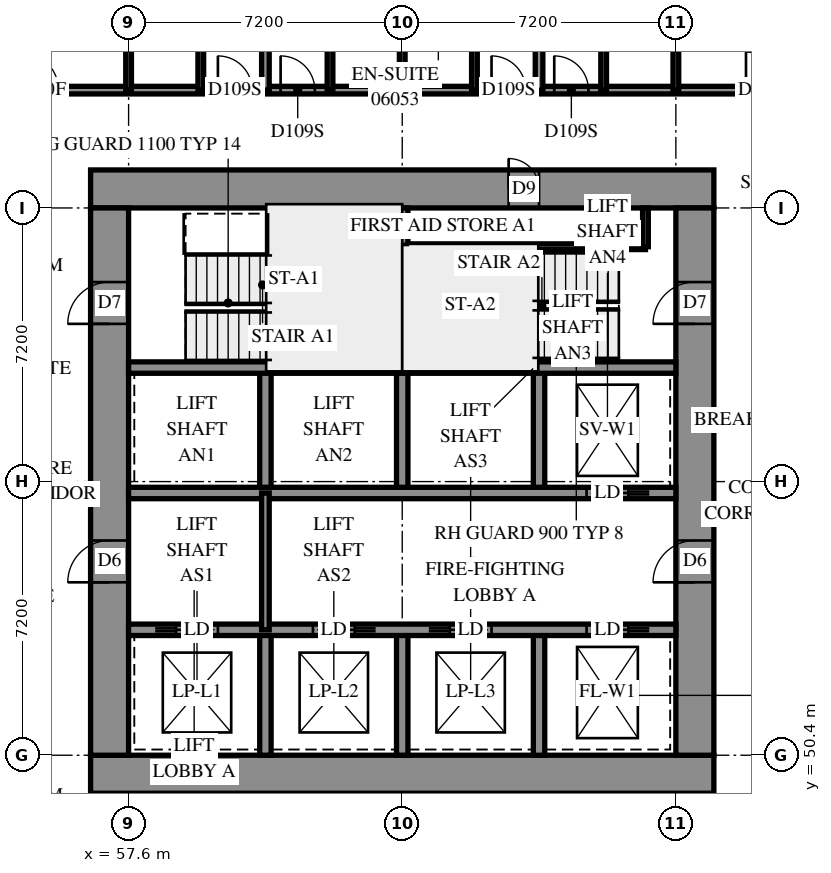
"""IFC4 building model, lengths in metres.
Left out: names, types, materials, properties, quantities, classifications, styles, units other than length and angle.
Written with IfcOpenShell. Run it as: python <this file> out.ifc"""

import sys

from ifc_helpers import new_model, si_unit, direction, frame, frame_2d, origin, place, context, subcontext, project, spatial, rectangle, extrude, element, fill, save


model = new_model("IFC4")
c1 = context("Model", 3, precision=1e-05, world=origin(), true_north=direction((0.0, 1.0)))
c2 = subcontext(c1, "Body", "Model", "MODEL_VIEW")
j1 = project(units=[si_unit("LENGTHUNIT", "METRE"), si_unit("PLANEANGLEUNIT", "RADIAN")], contexts=[c1])
p1 = place(None, origin())
s1 = spatial("IfcSite", under=j1, at=p1, CompositionType="ELEMENT")
p2 = place(p1, origin())
s2 = spatial("IfcBuilding", under=s1, at=p2, CompositionType="ELEMENT")
p3 = place(p2, frame((0.0, 0.0, 27.0)))
s3 = spatial("IfcBuildingStorey", under=s2, at=p3, CompositionType="ELEMENT", Elevation=27.0)
p4 = place(p3, frame((56.6, 49.9, -0.3), z_axis=(0.0, 0.0, 1.0), x_axis=(1.0, 0.0, 0.0)))
e1 = element("IfcWall", 1, at=p4, inside=s3, PredefinedType="SHEAR", context=c2, shape_type="SweptSolid", body=[
    extrude(rectangle(XDim=16.4, YDim=1.0, at=frame_2d((8.2, 0.0))), origin(), (0.0, 0.0, 1.0), 2.7),
])
p5 = place(p3, frame((56.6, 65.3, -0.3), z_axis=(0.0, 0.0, 1.0), x_axis=(1.0, 0.0, 0.0)))
e2 = element("IfcWall", 2, at=p5, inside=s3, PredefinedType="SHEAR", context=c2, shape_type="SweptSolid", body=[
    extrude(rectangle(XDim=16.4, YDim=1.0, at=frame_2d((8.2, 0.0))), origin(), (0.0, 0.0, 1.0), 2.7),
])
p6 = place(p5, frame((11.0, 0.0, 0.3)))
e3 = element("IfcOpeningElement", 3, at=p6, cuts=e2, PredefinedType="OPENING", context=c2, shape_type="SweptSolid", body=[
    extrude(rectangle(XDim=0.8, YDim=2.1, at=frame_2d((0.4, 1.05))), frame((0.0, 0.51, 0.0), z_axis=(0.0, -1.0, 0.0), x_axis=(1.0, 0.0, 0.0)), (0.0, 0.0, 1.0), 1.02),
])
p7 = place(p3, frame((57.1, 50.4, -0.3), z_axis=(0.0, 0.0, 1.0), x_axis=(0.0, 1.0, 0.0)))
e4 = element("IfcWall", 4, at=p7, inside=s3, PredefinedType="SHEAR", context=c2, shape_type="SweptSolid", body=[
    extrude(rectangle(XDim=14.4, YDim=1.0, at=frame_2d((7.2, 0.0))), origin(), (0.0, 0.0, 1.0), 2.7),
])
p8 = place(p7, frame((4.55, 0.0, 0.3)))
e5 = element("IfcOpeningElement", 5, at=p8, cuts=e4, PredefinedType="OPENING", context=c2, shape_type="SweptSolid", body=[
    extrude(rectangle(XDim=1.1, YDim=2.1, at=frame_2d((0.55, 1.05))), frame((0.0, 0.51, 0.0), z_axis=(0.0, -1.0, 0.0), x_axis=(1.0, 0.0, 0.0)), (0.0, 0.0, 1.0), 1.02),
])
p9 = place(p7, frame((11.35, 0.0, 0.3)))
e6 = element("IfcOpeningElement", 6, at=p9, cuts=e4, PredefinedType="OPENING", context=c2, shape_type="SweptSolid", body=[
    extrude(rectangle(XDim=1.1, YDim=2.1, at=frame_2d((0.55, 1.05))), frame((0.0, 0.51, 0.0), z_axis=(0.0, -1.0, 0.0), x_axis=(1.0, 0.0, 0.0)), (0.0, 0.0, 1.0), 1.02),
])
p10 = place(p3, frame((72.5, 50.4, -0.3), z_axis=(0.0, 0.0, 1.0), x_axis=(0.0, 1.0, 0.0)))
e7 = element("IfcWall", 7, at=p10, inside=s3, PredefinedType="SHEAR", context=c2, shape_type="SweptSolid", body=[
    extrude(rectangle(XDim=14.4, YDim=1.0, at=frame_2d((7.2, 0.0))), origin(), (0.0, 0.0, 1.0), 2.7),
])
p11 = place(p10, frame((4.55, 0.0, 0.3)))
e8 = element("IfcOpeningElement", 8, at=p11, cuts=e7, PredefinedType="OPENING", context=c2, shape_type="SweptSolid", body=[
    extrude(rectangle(XDim=1.1, YDim=2.1, at=frame_2d((0.55, 1.05))), frame((0.0, 0.51, 0.0), z_axis=(0.0, -1.0, 0.0), x_axis=(1.0, 0.0, 0.0)), (0.0, 0.0, 1.0), 1.02),
])
p12 = place(p10, frame((11.35, 0.0, 0.3)))
e9 = element("IfcOpeningElement", 9, at=p12, cuts=e7, PredefinedType="OPENING", context=c2, shape_type="SweptSolid", body=[
    extrude(rectangle(XDim=1.1, YDim=2.1, at=frame_2d((0.55, 1.05))), frame((0.0, 0.51, 0.0), z_axis=(0.0, -1.0, 0.0), x_axis=(1.0, 0.0, 0.0)), (0.0, 0.0, 1.0), 1.02),
])
for number, where, z_axis, x_axis in (
    (10, (61.2, 50.4, 0.0), (0.0, 0.0, 1.0), (0.0, 1.0, 0.0)),
    (11, (61.2, 57.3, 0.0), (0.0, 0.0, 1.0), (0.0, 1.0, 0.0)),
    (12, (64.8, 50.4, 0.0), (0.0, 0.0, 1.0), (0.0, 1.0, 0.0)),
    (13, (64.8, 57.3, 0.0), (0.0, 0.0, 1.0), (0.0, 1.0, 0.0)),
    (14, (68.4, 50.4, 0.0), (0.0, 0.0, 1.0), (0.0, 1.0, 0.0)),
    (15, (68.4, 57.3, 0.0), (0.0, 0.0, 1.0), (0.0, 1.0, 0.0)),
):
    element("IfcWall", number, at=place(p3, frame(where, z_axis=z_axis, x_axis=x_axis)), inside=s3, PredefinedType="SOLIDWALL", context=c2, shape_type="SweptSolid", body=[
        extrude(rectangle(XDim=3.3, YDim=0.3, at=frame_2d((1.65, 0.0))), origin(), (0.0, 0.0, 1.0), 3.1),
    ])
p13 = place(p3, frame((57.6, 53.7, 0.0), z_axis=(0.0, 0.0, 1.0), x_axis=(1.0, 0.0, 0.0)))
e16 = element("IfcWall", 16, at=p13, inside=s3, PredefinedType="SOLIDWALL", context=c2, shape_type="SweptSolid", body=[
    extrude(rectangle(XDim=14.4, YDim=0.3, at=frame_2d((7.2, 0.0))), origin(), (0.0, 0.0, 1.0), 3.1),
])
p14 = place(p13, frame((1.25, 0.0, 0.0)))
e17 = element("IfcOpeningElement", 17, at=p14, cuts=e16, PredefinedType="OPENING", context=c2, shape_type="SweptSolid", body=[
    extrude(rectangle(XDim=1.1, YDim=2.1, at=frame_2d((0.55, 1.05))), frame((0.0, 0.16, 0.0), z_axis=(0.0, -1.0, 0.0), x_axis=(1.0, 0.0, 0.0)), (0.0, 0.0, 1.0), 0.32),
])
p15 = place(p13, frame((4.85, 0.0, 0.0)))
e18 = element("IfcOpeningElement", 18, at=p15, cuts=e16, PredefinedType="OPENING", context=c2, shape_type="SweptSolid", body=[
    extrude(rectangle(XDim=1.1, YDim=2.1, at=frame_2d((0.55, 1.05))), frame((0.0, 0.16, 0.0), z_axis=(0.0, -1.0, 0.0), x_axis=(1.0, 0.0, 0.0)), (0.0, 0.0, 1.0), 0.32),
])
p16 = place(p13, frame((8.45, 0.0, 0.0)))
e19 = element("IfcOpeningElement", 19, at=p16, cuts=e16, PredefinedType="OPENING", context=c2, shape_type="SweptSolid", body=[
    extrude(rectangle(XDim=1.1, YDim=2.1, at=frame_2d((0.55, 1.05))), frame((0.0, 0.16, 0.0), z_axis=(0.0, -1.0, 0.0), x_axis=(1.0, 0.0, 0.0)), (0.0, 0.0, 1.0), 0.32),
])
p17 = place(p13, frame((12.05, 0.0, 0.0)))
e20 = element("IfcOpeningElement", 20, at=p17, cuts=e16, PredefinedType="OPENING", context=c2, shape_type="SweptSolid", body=[
    extrude(rectangle(XDim=1.1, YDim=2.1, at=frame_2d((0.55, 1.05))), frame((0.0, 0.16, 0.0), z_axis=(0.0, -1.0, 0.0), x_axis=(1.0, 0.0, 0.0)), (0.0, 0.0, 1.0), 0.32),
])
p18 = place(p3, frame((57.6, 57.3, 0.0), z_axis=(0.0, 0.0, 1.0), x_axis=(1.0, 0.0, 0.0)))
e21 = element("IfcWall", 21, at=p18, inside=s3, PredefinedType="SOLIDWALL", context=c2, shape_type="SweptSolid", body=[
    extrude(rectangle(XDim=14.4, YDim=0.3, at=frame_2d((7.2, 0.0))), origin(), (0.0, 0.0, 1.0), 3.1),
])
p19 = place(p18, frame((12.05, 0.0, 0.0)))
e22 = element("IfcOpeningElement", 22, at=p19, cuts=e21, PredefinedType="OPENING", context=c2, shape_type="SweptSolid", body=[
    extrude(rectangle(XDim=1.1, YDim=2.1, at=frame_2d((0.55, 1.05))), frame((0.0, 0.16, 0.0), z_axis=(0.0, -1.0, 0.0), x_axis=(1.0, 0.0, 0.0)), (0.0, 0.0, 1.0), 0.32),
])
for number, where, z_axis, x_axis in (
    (23, (57.6, 60.6, 0.0), (0.0, 0.0, 1.0), (1.0, 0.0, 0.0)),
    (24, (64.8, 60.6, 0.0), (0.0, 0.0, 1.0), (1.0, 0.0, 0.0)),
):
    element("IfcWall", number, at=place(p3, frame(where, z_axis=z_axis, x_axis=x_axis)), inside=s3, PredefinedType="SOLIDWALL", context=c2, shape_type="SweptSolid", body=[
        extrude(rectangle(XDim=7.2, YDim=0.3, at=frame_2d((3.6, 0.0))), origin(), (0.0, 0.0, 1.0), 3.1),
    ])
p20 = place(p3, frame((64.8, 60.6, 0.0), z_axis=(0.0, 0.0, 1.0), x_axis=(0.0, 1.0, 0.0)))
e25 = element("IfcWall", 25, at=p20, inside=s3, PredefinedType="SOLIDWALL", context=c2, shape_type="SweptSolid", body=[
    extrude(rectangle(XDim=4.2, YDim=0.3, at=frame_2d((2.1, 0.0))), origin(), (0.0, 0.0, 1.0), 3.1),
])
p21 = place(p3, frame((64.95, 63.78, 0.0), z_axis=(0.0, 0.0, 1.0), x_axis=(1.0, 0.0, 0.0)))
e26 = element("IfcWall", 26, at=p21, inside=s3, PredefinedType="PARTITIONING", context=c2, shape_type="SweptSolid", body=[
    extrude(rectangle(XDim=6.25, YDim=0.15, at=frame_2d((3.125, 0.0))), origin(), (0.0, 0.0, 1.0), 3.1),
])
p22 = place(p3, frame((71.2, 63.78, 0.0), z_axis=(0.0, 0.0, 1.0), x_axis=(0.0, 1.0, 0.0)))
e27 = element("IfcWall", 27, at=p22, inside=s3, PredefinedType="PARTITIONING", context=c2, shape_type="SweptSolid", body=[
    extrude(rectangle(XDim=1.02, YDim=0.15, at=frame_2d((0.51, 0.0))), origin(), (0.0, 0.0, 1.0), 3.1),
])
p23 = place(p3, frame((61.2, 53.7, 0.0), z_axis=(0.0, 0.0, 1.0), x_axis=(0.0, 1.0, 0.0)))
e28 = element("IfcWall", 28, at=p23, inside=s3, PredefinedType="PARTITIONING", context=c2, shape_type="SweptSolid", body=[
    extrude(rectangle(XDim=3.6, YDim=0.2, at=frame_2d((1.8, 0.0))), origin(), (0.0, 0.0, 1.0), 3.1),
])
p24 = place(p3, frame((54.5, 67.9, 0.0), z_axis=(0.0, 0.0, 1.0), x_axis=(1.0, 0.0, 0.0)))
e29 = element("IfcWall", 29, at=p24, inside=s3, PredefinedType="PARTITIONING", context=c2, shape_type="SweptSolid", body=[
    extrude(rectangle(XDim=20.6, YDim=0.2, at=frame_2d((10.3, 0.0))), origin(), (0.0, 0.0, 1.0), 3.1),
])
p25 = place(p24, frame((0.255, 0.0, 0.0)))
e30 = element("IfcOpeningElement", 30, at=p25, cuts=e29, PredefinedType="OPENING", context=c2, shape_type="SweptSolid", body=[
    extrude(rectangle(XDim=1.0, YDim=2.1, at=frame_2d((0.5, 1.05))), frame((0.0, 0.11, 0.0), z_axis=(0.0, -1.0, 0.0), x_axis=(1.0, 0.0, 0.0)), (0.0, 0.0, 1.0), 0.22),
])
p26 = place(p24, frame((19.345, 0.0, 0.0)))
e31 = element("IfcOpeningElement", 31, at=p26, cuts=e29, PredefinedType="OPENING", context=c2, shape_type="SweptSolid", body=[
    extrude(rectangle(XDim=1.0, YDim=2.1, at=frame_2d((0.5, 1.05))), frame((0.0, 0.11, 0.0), z_axis=(0.0, -1.0, 0.0), x_axis=(1.0, 0.0, 0.0)), (0.0, 0.0, 1.0), 0.22),
])
p27 = place(p24, frame((5.45, 0.0, 0.0)))
e32 = element("IfcOpeningElement", 32, at=p27, cuts=e29, PredefinedType="OPENING", context=c2, shape_type="SweptSolid", body=[
    extrude(rectangle(XDim=0.9, YDim=2.1, at=frame_2d((0.45, 1.05))), frame((0.0, 0.11, 0.0), z_axis=(0.0, -1.0, 0.0), x_axis=(1.0, 0.0, 0.0)), (0.0, 0.0, 1.0), 0.22),
])
p28 = place(p24, frame((7.1, 0.0, 0.0)))
e33 = element("IfcOpeningElement", 33, at=p28, cuts=e29, PredefinedType="OPENING", context=c2, shape_type="SweptSolid", body=[
    extrude(rectangle(XDim=0.9, YDim=2.1, at=frame_2d((0.45, 1.05))), frame((0.0, 0.11, 0.0), z_axis=(0.0, -1.0, 0.0), x_axis=(1.0, 0.0, 0.0)), (0.0, 0.0, 1.0), 0.22),
])
p29 = place(p24, frame((12.65, 0.0, 0.0)))
e34 = element("IfcOpeningElement", 34, at=p29, cuts=e29, PredefinedType="OPENING", context=c2, shape_type="SweptSolid", body=[
    extrude(rectangle(XDim=0.9, YDim=2.1, at=frame_2d((0.45, 1.05))), frame((0.0, 0.11, 0.0), z_axis=(0.0, -1.0, 0.0), x_axis=(1.0, 0.0, 0.0)), (0.0, 0.0, 1.0), 0.22),
])
p30 = place(p24, frame((14.3, 0.0, 0.0)))
e35 = element("IfcOpeningElement", 35, at=p30, cuts=e29, PredefinedType="OPENING", context=c2, shape_type="SweptSolid", body=[
    extrude(rectangle(XDim=0.9, YDim=2.1, at=frame_2d((0.45, 1.05))), frame((0.0, 0.11, 0.0), z_axis=(0.0, -1.0, 0.0), x_axis=(1.0, 0.0, 0.0)), (0.0, 0.0, 1.0), 0.22),
])
p31 = place(p3, frame((68.4, 67.9, 0.0), z_axis=(0.0, 0.0, 1.0), x_axis=(0.0, 1.0, 0.0)))
e36 = element("IfcWall", 36, at=p31, inside=s3, PredefinedType="PARTITIONING", context=c2, shape_type="SweptSolid", body=[
    extrude(rectangle(XDim=4.773, YDim=0.2, at=frame_2d((2.387, 0.0))), origin(), (0.0, 0.0, 1.0), 3.1),
])
p32 = place(p3, frame((61.2, 67.9, 0.0), z_axis=(0.0, 0.0, 1.0), x_axis=(0.0, 1.0, 0.0)))
e37 = element("IfcWall", 37, at=p32, inside=s3, PredefinedType="PARTITIONING", context=c2, shape_type="SweptSolid", body=[
    extrude(rectangle(XDim=4.753, YDim=0.2, at=frame_2d((2.377, 0.0))), origin(), (0.0, 0.0, 1.0), 3.1),
])
for number, where, z_axis, x_axis in (
    (38, (59.5, 67.9, 0.0), (0.0, 0.0, 1.0), (0.0, 1.0, 0.0)),
    (39, (57.6, 67.9, 0.0), (0.0, 0.0, 1.0), (0.0, 1.0, 0.0)),
    (40, (62.9, 67.9, 0.0), (0.0, 0.0, 1.0), (0.0, 1.0, 0.0)),
    (41, (66.7, 67.9, 0.0), (0.0, 0.0, 1.0), (0.0, 1.0, 0.0)),
    (42, (64.8, 67.9, 0.0), (0.0, 0.0, 1.0), (0.0, 1.0, 0.0)),
    (43, (70.1, 67.9, 0.0), (0.0, 0.0, 1.0), (0.0, 1.0, 0.0)),
    (44, (72.0, 67.9, 0.0), (0.0, 0.0, 1.0), (0.0, 1.0, 0.0)),
):
    element("IfcWall", number, at=place(p3, frame(where, z_axis=z_axis, x_axis=x_axis)), inside=s3, PredefinedType="PARTITIONING", context=c2, shape_type="SweptSolid", body=[
        extrude(rectangle(XDim=2.4, YDim=0.15, at=frame_2d((1.2, 0.0))), origin(), (0.0, 0.0, 1.0), 3.1),
    ])
p33 = place(p6, origin())
e45 = element("IfcDoor", 45, at=p33, inside=s3, OperationType="SINGLE_SWING_RIGHT", PredefinedType="DOOR", context=c2, shape_type="SweptSolid", body=[
    extrude(rectangle(XDim=0.8, YDim=2.1, at=frame_2d((0.4, 1.05))), frame((0.0, -0.44, 0.0), z_axis=(0.0, -1.0, 0.0), x_axis=(1.0, 0.0, 0.0)), (0.0, 0.0, 1.0), 0.05),
])
fill(e3, e45)
p34 = place(p8, origin())
e46 = element("IfcDoor", 46, at=p34, inside=s3, OperationType="DOUBLE_DOOR_SINGLE_SWING", PredefinedType="DOOR", context=c2, shape_type="SweptSolid", body=[
    extrude(rectangle(XDim=1.1, YDim=2.1, at=frame_2d((0.55, 1.05))), frame((0.0, 0.025, 0.0), z_axis=(0.0, -1.0, 0.0), x_axis=(1.0, 0.0, 0.0)), (0.0, 0.0, 1.0), 0.05),
])
fill(e5, e46)
p35 = place(p11, origin())
e47 = element("IfcDoor", 47, at=p35, inside=s3, OperationType="DOUBLE_DOOR_SINGLE_SWING", PredefinedType="DOOR", context=c2, shape_type="SweptSolid", body=[
    extrude(rectangle(XDim=1.1, YDim=2.1, at=frame_2d((0.55, 1.05))), frame((0.0, 0.025, 0.0), z_axis=(0.0, -1.0, 0.0), x_axis=(1.0, 0.0, 0.0)), (0.0, 0.0, 1.0), 0.05),
])
fill(e8, e47)
p36 = place(p9, origin())
e48 = element("IfcDoor", 48, at=p36, inside=s3, OperationType="SINGLE_SWING_LEFT", PredefinedType="DOOR", context=c2, shape_type="SweptSolid", body=[
    extrude(rectangle(XDim=1.1, YDim=2.1, at=frame_2d((0.55, 1.05))), frame((0.0, 0.025, 0.0), z_axis=(0.0, -1.0, 0.0), x_axis=(1.0, 0.0, 0.0)), (0.0, 0.0, 1.0), 0.05),
])
fill(e6, e48)
p37 = place(p12, origin())
e49 = element("IfcDoor", 49, at=p37, inside=s3, OperationType="SINGLE_SWING_RIGHT", PredefinedType="DOOR", context=c2, shape_type="SweptSolid", body=[
    extrude(rectangle(XDim=1.1, YDim=2.1, at=frame_2d((0.55, 1.05))), frame((0.0, 0.025, 0.0), z_axis=(0.0, -1.0, 0.0), x_axis=(1.0, 0.0, 0.0)), (0.0, 0.0, 1.0), 0.05),
])
fill(e9, e49)
p38 = place(p14, origin())
e50 = element("IfcDoor", 50, at=p38, inside=s3, OperationType="SLIDING_TO_LEFT", PredefinedType="DOOR", context=c2, shape_type="SweptSolid", body=[
    extrude(rectangle(XDim=1.1, YDim=2.1, at=frame_2d((0.55, 1.05))), frame((0.0, 0.025, 0.0), z_axis=(0.0, -1.0, 0.0), x_axis=(1.0, 0.0, 0.0)), (0.0, 0.0, 1.0), 0.05),
])
fill(e17, e50)
p39 = place(p15, origin())
e51 = element("IfcDoor", 51, at=p39, inside=s3, OperationType="SLIDING_TO_RIGHT", PredefinedType="DOOR", context=c2, shape_type="SweptSolid", body=[
    extrude(rectangle(XDim=1.1, YDim=2.1, at=frame_2d((0.55, 1.05))), frame((0.0, 0.025, 0.0), z_axis=(0.0, -1.0, 0.0), x_axis=(1.0, 0.0, 0.0)), (0.0, 0.0, 1.0), 0.05),
])
fill(e18, e51)
p40 = place(p16, origin())
e52 = element("IfcDoor", 52, at=p40, inside=s3, OperationType="SLIDING_TO_LEFT", PredefinedType="DOOR", context=c2, shape_type="SweptSolid", body=[
    extrude(rectangle(XDim=1.1, YDim=2.1, at=frame_2d((0.55, 1.05))), frame((0.0, 0.025, 0.0), z_axis=(0.0, -1.0, 0.0), x_axis=(1.0, 0.0, 0.0)), (0.0, 0.0, 1.0), 0.05),
])
fill(e19, e52)
p41 = place(p17, origin())
e53 = element("IfcDoor", 53, at=p41, inside=s3, OperationType="SLIDING_TO_RIGHT", PredefinedType="DOOR", context=c2, shape_type="SweptSolid", body=[
    extrude(rectangle(XDim=1.1, YDim=2.1, at=frame_2d((0.55, 1.05))), frame((0.0, 0.025, 0.0), z_axis=(0.0, -1.0, 0.0), x_axis=(1.0, 0.0, 0.0)), (0.0, 0.0, 1.0), 0.05),
])
fill(e20, e53)
p42 = place(p19, origin())
e54 = element("IfcDoor", 54, at=p42, inside=s3, OperationType="SLIDING_TO_RIGHT", PredefinedType="DOOR", context=c2, shape_type="SweptSolid", body=[
    extrude(rectangle(XDim=1.1, YDim=2.1, at=frame_2d((0.55, 1.05))), frame((0.0, 0.025, 0.0), z_axis=(0.0, -1.0, 0.0), x_axis=(1.0, 0.0, 0.0)), (0.0, 0.0, 1.0), 0.05),
])
fill(e22, e54)
p43 = place(p25, origin())
e55 = element("IfcDoor", 55, at=p43, inside=s3, OperationType="SINGLE_SWING_LEFT", PredefinedType="DOOR", context=c2, shape_type="SweptSolid", body=[
    extrude(rectangle(XDim=1.0, YDim=2.1, at=frame_2d((0.5, 1.05))), frame((0.0, 0.025, 0.0), z_axis=(0.0, -1.0, 0.0), x_axis=(1.0, 0.0, 0.0)), (0.0, 0.0, 1.0), 0.05),
])
fill(e30, e55)
p44 = place(p26, origin())
e56 = element("IfcDoor", 56, at=p44, inside=s3, OperationType="SINGLE_SWING_RIGHT", PredefinedType="DOOR", context=c2, shape_type="SweptSolid", body=[
    extrude(rectangle(XDim=1.0, YDim=2.1, at=frame_2d((0.5, 1.05))), frame((0.0, 0.025, 0.0), z_axis=(0.0, -1.0, 0.0), x_axis=(1.0, 0.0, 0.0)), (0.0, 0.0, 1.0), 0.05),
])
fill(e31, e56)
p45 = place(p27, origin())
e57 = element("IfcDoor", 57, at=p45, inside=s3, OperationType="SINGLE_SWING_RIGHT", PredefinedType="DOOR", context=c2, shape_type="SweptSolid", body=[
    extrude(rectangle(XDim=0.9, YDim=2.1, at=frame_2d((0.45, 1.05))), frame((0.0, 0.025, 0.0), z_axis=(0.0, -1.0, 0.0), x_axis=(1.0, 0.0, 0.0)), (0.0, 0.0, 1.0), 0.05),
])
fill(e32, e57)
p46 = place(p28, origin())
e58 = element("IfcDoor", 58, at=p46, inside=s3, OperationType="SINGLE_SWING_LEFT", PredefinedType="DOOR", context=c2, shape_type="SweptSolid", body=[
    extrude(rectangle(XDim=0.9, YDim=2.1, at=frame_2d((0.45, 1.05))), frame((0.0, 0.025, 0.0), z_axis=(0.0, -1.0, 0.0), x_axis=(1.0, 0.0, 0.0)), (0.0, 0.0, 1.0), 0.05),
])
fill(e33, e58)
p47 = place(p29, origin())
e59 = element("IfcDoor", 59, at=p47, inside=s3, OperationType="SINGLE_SWING_RIGHT", PredefinedType="DOOR", context=c2, shape_type="SweptSolid", body=[
    extrude(rectangle(XDim=0.9, YDim=2.1, at=frame_2d((0.45, 1.05))), frame((0.0, 0.025, 0.0), z_axis=(0.0, -1.0, 0.0), x_axis=(1.0, 0.0, 0.0)), (0.0, 0.0, 1.0), 0.05),
])
fill(e34, e59)
p48 = place(p30, origin())
e60 = element("IfcDoor", 60, at=p48, inside=s3, OperationType="SINGLE_SWING_LEFT", PredefinedType="DOOR", context=c2, shape_type="SweptSolid", body=[
    extrude(rectangle(XDim=0.9, YDim=2.1, at=frame_2d((0.45, 1.05))), frame((0.0, 0.025, 0.0), z_axis=(0.0, -1.0, 0.0), x_axis=(1.0, 0.0, 0.0)), (0.0, 0.0, 1.0), 0.05),
])
fill(e35, e60)
save(model, sys.argv[1])
